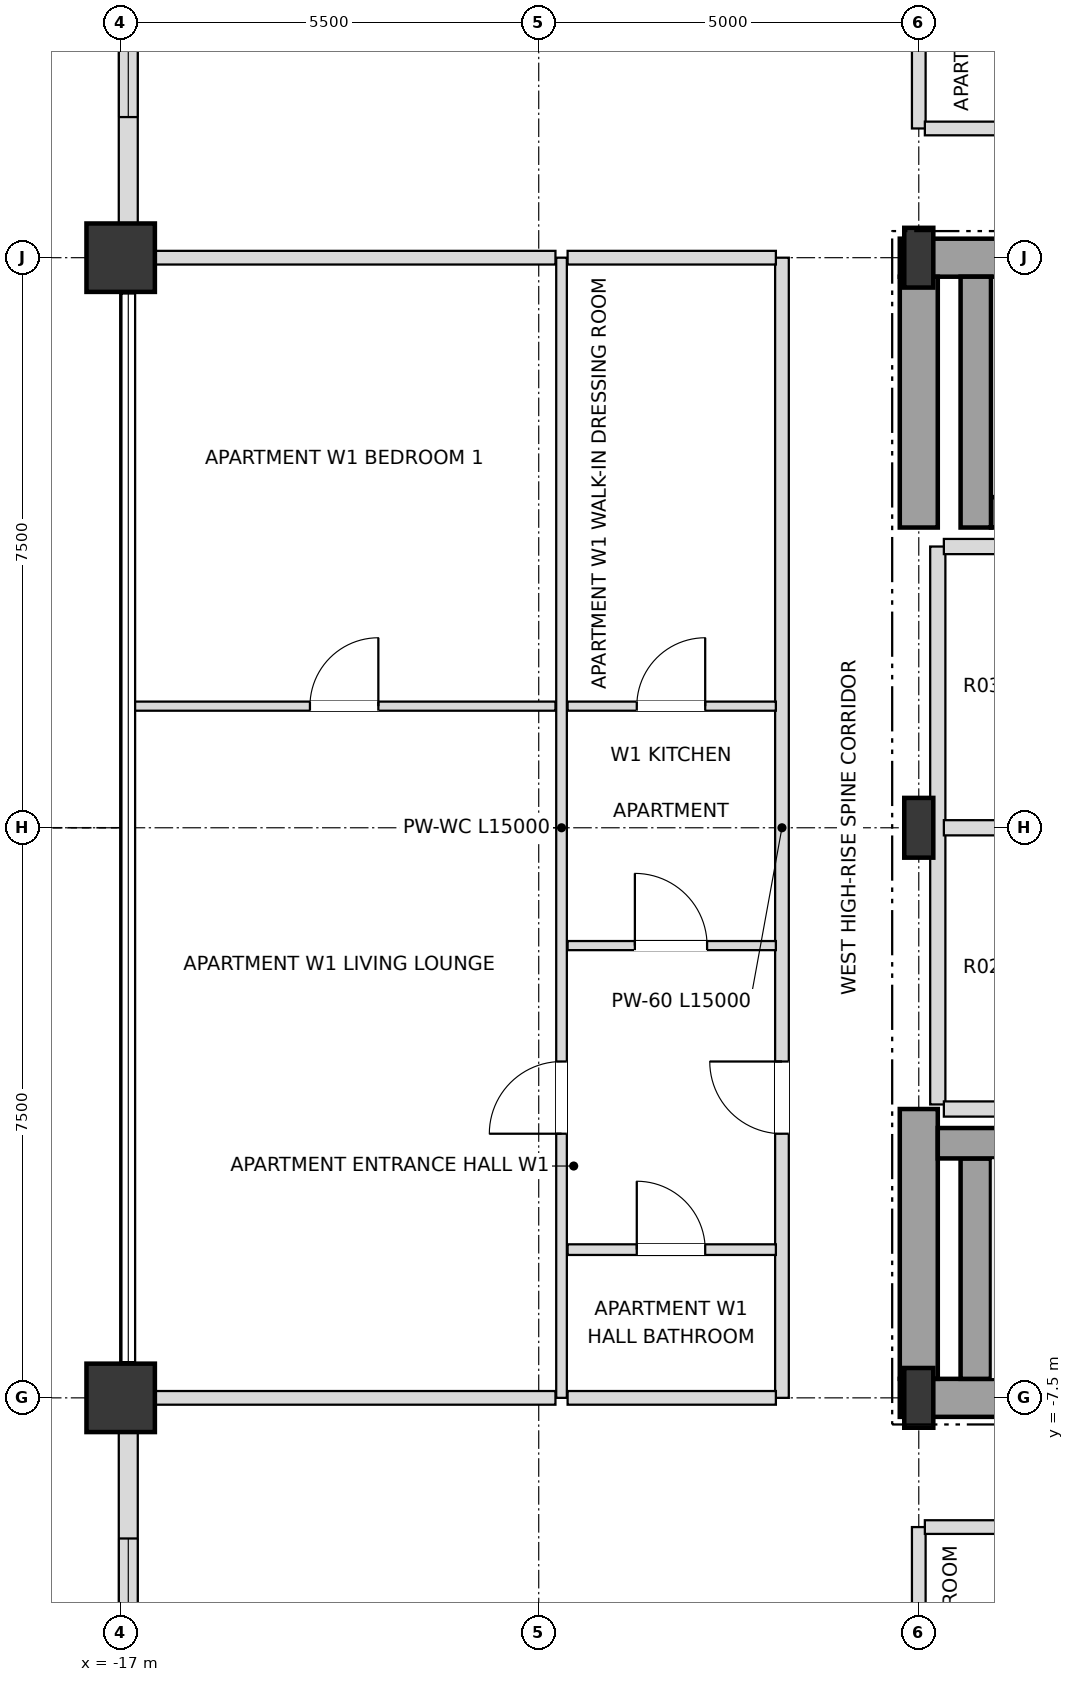
"""IFC4 building model, lengths in metres.
Left out: names, types, materials, properties, quantities, classifications, styles, units other than length and angle.
Written with IfcOpenShell. Run it as: python <this file> out.ifc"""

import sys

from ifc_helpers import new_model, si_unit, direction, frame, frame_2d, origin, origin_2d, place, context, subcontext, project, spatial, rectangle, i_section, extrude, element, fill, save


model = new_model("IFC4")
c1 = context("Model", 3, precision=1e-05, world=origin(), true_north=direction((0.0, 1.0)))
c2 = subcontext(c1, "Body", "Model", "MODEL_VIEW")
j1 = project(units=[si_unit("LENGTHUNIT", "METRE"), si_unit("PLANEANGLEUNIT", "RADIAN")], contexts=[c1])
p1 = place(None, origin())
s1 = spatial("IfcSite", under=j1, at=p1, CompositionType="ELEMENT")
p2 = place(p1, origin())
s2 = spatial("IfcBuilding", under=s1, at=p2, CompositionType="ELEMENT")
p3 = place(p2, frame((0.0, 0.0, 229.5)))
s3 = spatial("IfcBuildingStorey", under=s2, at=p3, CompositionType="ELEMENT", Elevation=229.5)
for number, where, z_axis, x_axis in (
    (1, (-6.5, -7.5, 0.0), (0.0, 0.0, 1.0), (1.0, 0.0, 0.0)),
    (2, (-6.5, 0.0, 0.0), (0.0, 0.0, 1.0), (1.0, 0.0, 0.0)),
    (3, (-6.5, 7.5, 0.0), (0.0, 0.0, 1.0), (1.0, 0.0, 0.0)),
):
    element("IfcColumn", number, at=place(p3, frame(where, z_axis=z_axis, x_axis=x_axis)), inside=s3, PredefinedType="COLUMN", context=c2, shape_type="SweptSolid", body=[
        extrude(i_section(OverallWidth=0.382, OverallDepth=0.786, WebThickness=0.02, FlangeThickness=0.033, at=origin_2d()), origin(), (0.0, 0.0, 1.0), 3.6),
    ])
for number, where, z_axis, x_axis in (
    (4, (-17.0, 7.5, 0.0), (0.0, 0.0, 1.0), (1.0, 0.0, 0.0)),
    (5, (-17.0, -7.5, 0.0), (0.0, 0.0, 1.0), (1.0, 0.0, 0.0)),
):
    element("IfcColumn", number, at=place(p3, frame(where, z_axis=z_axis, x_axis=x_axis)), inside=s3, PredefinedType="USERDEFINED", context=c2, shape_type="SweptSolid", body=[
        extrude(rectangle(XDim=0.9, YDim=0.9, at=origin_2d()), origin(), (0.0, 0.0, 1.0), 3.6),
    ])
p4 = place(p3, frame((-16.9, 12.555, 0.0), z_axis=(0.0, 0.0, 1.0), x_axis=(0.0, -1.0, 0.0)))
e6 = element("IfcWall", 6, at=p4, inside=s3, PredefinedType="SOLIDWALL", context=c2, shape_type="SweptSolid", body=[
    extrude(rectangle(XDim=4.61, YDim=0.25, at=frame_2d((2.305, 0.0))), origin(), (0.0, 0.0, 1.0), 2.748),
])
p5 = place(p4, frame((1.405, 0.0, 0.72)))
e7 = element("IfcOpeningElement", 7, at=p5, cuts=e6, PredefinedType="OPENING", context=c2, shape_type="SweptSolid", body=[
    extrude(rectangle(XDim=1.8, YDim=1.68, at=frame_2d((0.9, 0.84))), frame((0.0, 0.135, 0.0), z_axis=(0.0, -1.0, 0.0), x_axis=(1.0, 0.0, 0.0)), (0.0, 0.0, 1.0), 0.27),
])
p6 = place(p3, frame((-16.9, -7.945, 0.0), z_axis=(0.0, 0.0, 1.0), x_axis=(0.0, -1.0, 0.0)))
e8 = element("IfcWall", 8, at=p6, inside=s3, PredefinedType="SOLIDWALL", context=c2, shape_type="SweptSolid", body=[
    extrude(rectangle(XDim=4.61, YDim=0.25, at=frame_2d((2.305, 0.0))), origin(), (0.0, 0.0, 1.0), 2.748),
])
p7 = place(p6, frame((1.405, 0.0, 0.72)))
e9 = element("IfcOpeningElement", 9, at=p7, cuts=e8, PredefinedType="OPENING", context=c2, shape_type="SweptSolid", body=[
    extrude(rectangle(XDim=1.8, YDim=1.68, at=frame_2d((0.9, 0.84))), frame((0.0, 0.135, 0.0), z_axis=(0.0, -1.0, 0.0), x_axis=(1.0, 0.0, 0.0)), (0.0, 0.0, 1.0), 0.27),
])
p8 = place(p3, frame((-6.75, -7.5, 0.0), z_axis=(0.0, 0.0, 1.0), x_axis=(1.0, 0.0, 0.0)))
e10 = element("IfcWall", 10, at=p8, inside=s3, PredefinedType="SHEAR", context=c2, shape_type="SweptSolid", body=[
    extrude(rectangle(XDim=6.75, YDim=0.5, at=frame_2d((3.375, 0.0))), origin(), (0.0, 0.0, 1.0), 3.38),
])
p9 = place(p3, frame((-6.75, 7.5, 0.0), z_axis=(0.0, 0.0, 1.0), x_axis=(1.0, 0.0, 0.0)))
e11 = element("IfcWall", 11, at=p9, inside=s3, PredefinedType="SHEAR", context=c2, shape_type="SweptSolid", body=[
    extrude(rectangle(XDim=6.75, YDim=0.5, at=frame_2d((3.375, 0.0))), origin(), (0.0, 0.0, 1.0), 3.38),
])
p10 = place(p9, frame((1.65, 0.0, 0.0)))
e12 = element("IfcOpeningElement", 12, at=p10, cuts=e11, PredefinedType="OPENING", context=c2, shape_type="SweptSolid", body=[
    extrude(rectangle(XDim=1.05, YDim=2.15, at=frame_2d((0.525, 1.075))), frame((0.0, 0.26, 0.0), z_axis=(0.0, -1.0, 0.0), x_axis=(1.0, 0.0, 0.0)), (0.0, 0.0, 1.0), 0.52),
])
p11 = place(p3, frame((-6.5, -7.25, 0.0), z_axis=(0.0, 0.0, 1.0), x_axis=(0.0, 1.0, 0.0)))
e13 = element("IfcWall", 13, at=p11, inside=s3, PredefinedType="SHEAR", context=c2, shape_type="SweptSolid", body=[
    extrude(rectangle(XDim=3.55, YDim=0.5, at=frame_2d((1.775, 0.0))), origin(), (0.0, 0.0, 1.0), 3.38),
])
p12 = place(p3, frame((-6.5, 3.95, 0.0), z_axis=(0.0, 0.0, 1.0), x_axis=(0.0, 1.0, 0.0)))
e14 = element("IfcWall", 14, at=p12, inside=s3, PredefinedType="SHEAR", context=c2, shape_type="SweptSolid", body=[
    extrude(rectangle(XDim=3.3, YDim=0.5, at=frame_2d((1.65, 0.0))), origin(), (0.0, 0.0, 1.0), 3.38),
])
p13 = place(p3, frame((-5.75, -7.25, 0.0), z_axis=(0.0, 0.0, 1.0), x_axis=(0.0, 1.0, 0.0)))
e15 = element("IfcWall", 15, at=p13, inside=s3, PredefinedType="SHEAR", context=c2, shape_type="SweptSolid", body=[
    extrude(rectangle(XDim=2.9, YDim=0.4, at=frame_2d((1.45, 0.0))), origin(), (0.0, 0.0, 1.0), 3.38),
])
p14 = place(p3, frame((-6.25, -4.15, 0.0), z_axis=(0.0, 0.0, 1.0), x_axis=(1.0, 0.0, 0.0)))
e16 = element("IfcWall", 16, at=p14, inside=s3, PredefinedType="SHEAR", context=c2, shape_type="SweptSolid", body=[
    extrude(rectangle(XDim=7.78, YDim=0.4, at=frame_2d((3.89, 0.0))), origin(), (0.0, 0.0, 1.0), 3.38),
])
p15 = place(p3, frame((-5.55, 4.15, 0.0), z_axis=(0.0, 0.0, 1.0), x_axis=(1.0, 0.0, 0.0)))
e17 = element("IfcWall", 17, at=p15, inside=s3, PredefinedType="SHEAR", context=c2, shape_type="SweptSolid", body=[
    extrude(rectangle(XDim=7.08, YDim=0.4, at=frame_2d((3.54, 0.0))), origin(), (0.0, 0.0, 1.0), 3.38),
])
p16 = place(p3, frame((-5.75, 3.95, 0.0), z_axis=(0.0, 0.0, 1.0), x_axis=(0.0, 1.0, 0.0)))
e18 = element("IfcWall", 18, at=p16, inside=s3, PredefinedType="SHEAR", context=c2, shape_type="SweptSolid", body=[
    extrude(rectangle(XDim=3.3, YDim=0.4, at=frame_2d((1.65, 0.0))), origin(), (0.0, 0.0, 1.0), 3.38),
])
p17 = place(p3, frame((-11.2, -7.5, 0.0), z_axis=(0.0, 0.0, 1.0), x_axis=(0.0, 1.0, 0.0)))
e19 = element("IfcWall", 19, at=p17, inside=s3, PredefinedType="PARTITIONING", context=c2, shape_type="SweptSolid", body=[
    extrude(rectangle(XDim=15.0, YDim=0.14, at=frame_2d((7.5, 0.0))), origin(), (0.0, 0.0, 1.0), 3.38),
])
p18 = place(p17, frame((3.475, 0.0, 0.0)))
e20 = element("IfcOpeningElement", 20, at=p18, cuts=e19, PredefinedType="OPENING", context=c2, shape_type="SweptSolid", body=[
    extrude(rectangle(XDim=0.95, YDim=2.1, at=frame_2d((0.475, 1.05))), frame((0.0, 0.08, 0.0), z_axis=(0.0, -1.0, 0.0), x_axis=(1.0, 0.0, 0.0)), (0.0, 0.0, 1.0), 0.16),
])
p19 = place(p3, frame((-8.3, -7.5, 0.0), z_axis=(0.0, 0.0, 1.0), x_axis=(0.0, 1.0, 0.0)))
e21 = element("IfcWall", 21, at=p19, inside=s3, PredefinedType="PARTITIONING", context=c2, shape_type="SweptSolid", body=[
    extrude(rectangle(XDim=15.0, YDim=0.18, at=frame_2d((7.5, 0.0))), origin(), (0.0, 0.0, 1.0), 3.38),
])
p20 = place(p19, frame((3.475, 0.0, 0.0)))
e22 = element("IfcOpeningElement", 22, at=p20, cuts=e21, PredefinedType="OPENING", context=c2, shape_type="SweptSolid", body=[
    extrude(rectangle(XDim=0.95, YDim=2.15, at=frame_2d((0.475, 1.075))), frame((0.0, 0.1, 0.0), z_axis=(0.0, -1.0, 0.0), x_axis=(1.0, 0.0, 0.0)), (0.0, 0.0, 1.0), 0.2),
])
for number, where, z_axis, x_axis in (
    (23, (-6.5, -19.9, 0.0), (0.0, 0.0, 1.0), (0.0, 1.0, 0.0)),
    (24, (-6.5, 9.2, 0.0), (0.0, 0.0, 1.0), (0.0, 1.0, 0.0)),
):
    element("IfcWall", number, at=place(p3, frame(where, z_axis=z_axis, x_axis=x_axis)), inside=s3, PredefinedType="PARTITIONING", context=c2, shape_type="SweptSolid", body=[
        extrude(rectangle(XDim=10.7, YDim=0.18, at=frame_2d((5.35, 0.0))), origin(), (0.0, 0.0, 1.0), 2.826),
    ])
p21 = place(p3, frame((-6.25, -3.64, 0.0), z_axis=(0.0, 0.0, 1.0), x_axis=(0.0, 1.0, 0.0)))
e25 = element("IfcWall", 25, at=p21, inside=s3, PredefinedType="SOLIDWALL", context=c2, shape_type="SweptSolid", body=[
    extrude(rectangle(XDim=7.34, YDim=0.2, at=frame_2d((3.67, 0.0))), origin(), (0.0, 0.0, 1.0), 3.38),
])
p22 = place(p3, frame((-6.42, -9.2, 0.0), z_axis=(0.0, 0.0, 1.0), x_axis=(1.0, 0.0, 0.0)))
e26 = element("IfcWall", 26, at=p22, inside=s3, PredefinedType="PARTITIONING", context=c2, shape_type="SweptSolid", body=[
    extrude(rectangle(XDim=1.64, YDim=0.18, at=frame_2d((0.82, 0.0))), origin(), (0.0, 0.0, 1.0), 3.38),
])
p23 = place(p3, frame((-16.9, -7.5, 0.0), z_axis=(0.0, 0.0, 1.0), x_axis=(1.0, 0.0, 0.0)))
e27 = element("IfcWall", 27, at=p23, inside=s3, PredefinedType="PARTITIONING", context=c2, shape_type="SweptSolid", body=[
    extrude(rectangle(XDim=5.62, YDim=0.18, at=frame_2d((2.81, 0.0))), origin(), (0.0, 0.0, 1.0), 2.826),
])
p24 = place(p3, frame((-11.12, -7.5, 0.0), z_axis=(0.0, 0.0, 1.0), x_axis=(1.0, 0.0, 0.0)))
e28 = element("IfcWall", 28, at=p24, inside=s3, PredefinedType="PARTITIONING", context=c2, shape_type="SweptSolid", body=[
    extrude(rectangle(XDim=2.74, YDim=0.18, at=frame_2d((1.37, 0.0))), origin(), (0.0, 0.0, 1.0), 2.826),
])
p25 = place(p3, frame((-11.12, -5.55, 0.0), z_axis=(0.0, 0.0, 1.0), x_axis=(1.0, 0.0, 0.0)))
e29 = element("IfcWall", 29, at=p25, inside=s3, PredefinedType="PARTITIONING", context=c2, shape_type="SweptSolid", body=[
    extrude(rectangle(XDim=2.74, YDim=0.14, at=frame_2d((1.37, 0.0))), origin(), (0.0, 0.0, 1.0), 3.38),
])
p26 = place(p25, frame((0.91, 0.0, 0.0)))
e30 = element("IfcOpeningElement", 30, at=p26, cuts=e29, PredefinedType="OPENING", context=c2, shape_type="SweptSolid", body=[
    extrude(rectangle(XDim=0.9, YDim=2.1, at=frame_2d((0.45, 1.05))), frame((0.0, 0.08, 0.0), z_axis=(0.0, -1.0, 0.0), x_axis=(1.0, 0.0, 0.0)), (0.0, 0.0, 1.0), 0.16),
])
p27 = place(p3, frame((-6.17, -3.7, 0.0), z_axis=(0.0, 0.0, 1.0), x_axis=(1.0, 0.0, 0.0)))
e31 = element("IfcWall", 31, at=p27, inside=s3, PredefinedType="SOLIDWALL", context=c2, shape_type="SweptSolid", body=[
    extrude(rectangle(XDim=1.94, YDim=0.2, at=frame_2d((0.97, 0.0))), origin(), (0.0, 0.0, 1.0), 3.38),
])
p28 = place(p3, frame((-11.12, -1.55, 0.0), z_axis=(0.0, 0.0, 1.0), x_axis=(1.0, 0.0, 0.0)))
e32 = element("IfcWall", 32, at=p28, inside=s3, PredefinedType="PARTITIONING", context=c2, shape_type="SweptSolid", body=[
    extrude(rectangle(XDim=2.74, YDim=0.12, at=frame_2d((1.37, 0.0))), origin(), (0.0, 0.0, 1.0), 3.38),
])
p29 = place(p28, frame((0.885, 0.0, 0.0)))
e33 = element("IfcOpeningElement", 33, at=p29, cuts=e32, PredefinedType="OPENING", context=c2, shape_type="SweptSolid", body=[
    extrude(rectangle(XDim=0.95, YDim=2.1, at=frame_2d((0.475, 1.05))), frame((0.0, 0.07, 0.0), z_axis=(0.0, -1.0, 0.0), x_axis=(1.0, 0.0, 0.0)), (0.0, 0.0, 1.0), 0.14),
])
p30 = place(p3, frame((-6.17, 0.0, 0.0), z_axis=(0.0, 0.0, 1.0), x_axis=(1.0, 0.0, 0.0)))
e34 = element("IfcWall", 34, at=p30, inside=s3, PredefinedType="SOLIDWALL", context=c2, shape_type="SweptSolid", body=[
    extrude(rectangle(XDim=1.94, YDim=0.2, at=frame_2d((0.97, 0.0))), origin(), (0.0, 0.0, 1.0), 3.38),
])
p31 = place(p3, frame((-16.82, 1.6, 0.0), z_axis=(0.0, 0.0, 1.0), x_axis=(1.0, 0.0, 0.0)))
e35 = element("IfcWall", 35, at=p31, inside=s3, PredefinedType="PARTITIONING", context=c2, shape_type="SweptSolid", body=[
    extrude(rectangle(XDim=5.54, YDim=0.12, at=frame_2d((2.77, 0.0))), origin(), (0.0, 0.0, 1.0), 3.018),
])
p32 = place(p31, frame((2.31, 0.0, 0.0)))
e36 = element("IfcOpeningElement", 36, at=p32, cuts=e35, PredefinedType="OPENING", context=c2, shape_type="SweptSolid", body=[
    extrude(rectangle(XDim=0.9, YDim=2.1, at=frame_2d((0.45, 1.05))), frame((0.0, 0.07, 0.0), z_axis=(0.0, -1.0, 0.0), x_axis=(1.0, 0.0, 0.0)), (0.0, 0.0, 1.0), 0.14),
])
p33 = place(p3, frame((-11.12, 1.6, 0.0), z_axis=(0.0, 0.0, 1.0), x_axis=(1.0, 0.0, 0.0)))
e37 = element("IfcWall", 37, at=p33, inside=s3, PredefinedType="PARTITIONING", context=c2, shape_type="SweptSolid", body=[
    extrude(rectangle(XDim=2.74, YDim=0.12, at=frame_2d((1.37, 0.0))), origin(), (0.0, 0.0, 1.0), 3.38),
])
p34 = place(p33, frame((0.91, 0.0, 0.0)))
e38 = element("IfcOpeningElement", 38, at=p34, cuts=e37, PredefinedType="OPENING", context=c2, shape_type="SweptSolid", body=[
    extrude(rectangle(XDim=0.9, YDim=2.1, at=frame_2d((0.45, 1.05))), frame((0.0, 0.07, 0.0), z_axis=(0.0, -1.0, 0.0), x_axis=(1.0, 0.0, 0.0)), (0.0, 0.0, 1.0), 0.14),
])
p35 = place(p3, frame((-6.17, 3.7, 0.0), z_axis=(0.0, 0.0, 1.0), x_axis=(1.0, 0.0, 0.0)))
e39 = element("IfcWall", 39, at=p35, inside=s3, PredefinedType="SOLIDWALL", context=c2, shape_type="SweptSolid", body=[
    extrude(rectangle(XDim=1.94, YDim=0.2, at=frame_2d((0.97, 0.0))), origin(), (0.0, 0.0, 1.0), 3.38),
])
p36 = place(p3, frame((-16.9, 7.5, 0.0), z_axis=(0.0, 0.0, 1.0), x_axis=(1.0, 0.0, 0.0)))
e40 = element("IfcWall", 40, at=p36, inside=s3, PredefinedType="PARTITIONING", context=c2, shape_type="SweptSolid", body=[
    extrude(rectangle(XDim=5.62, YDim=0.18, at=frame_2d((2.81, 0.0))), origin(), (0.0, 0.0, 1.0), 2.826),
])
p37 = place(p3, frame((-11.12, 7.5, 0.0), z_axis=(0.0, 0.0, 1.0), x_axis=(1.0, 0.0, 0.0)))
e41 = element("IfcWall", 41, at=p37, inside=s3, PredefinedType="PARTITIONING", context=c2, shape_type="SweptSolid", body=[
    extrude(rectangle(XDim=2.74, YDim=0.18, at=frame_2d((1.37, 0.0))), origin(), (0.0, 0.0, 1.0), 2.826),
])
p38 = place(p3, frame((-6.42, 9.2, 0.0), z_axis=(0.0, 0.0, 1.0), x_axis=(1.0, 0.0, 0.0)))
e42 = element("IfcWall", 42, at=p38, inside=s3, PredefinedType="PARTITIONING", context=c2, shape_type="SweptSolid", body=[
    extrude(rectangle(XDim=1.79, YDim=0.18, at=frame_2d((0.895, 0.0))), origin(), (0.0, 0.0, 1.0), 3.38),
])
p39 = place(p5, origin())
e43 = element("IfcWindow", 43, at=p39, inside=s3, PartitioningType="SINGLE_PANEL", PredefinedType="WINDOW", context=c2, shape_type="SweptSolid", body=[
    extrude(rectangle(XDim=1.8, YDim=1.68, at=frame_2d((0.9, 0.84))), frame((0.0, 0.03, 0.0), z_axis=(0.0, -1.0, 0.0), x_axis=(1.0, 0.0, 0.0)), (0.0, 0.0, 1.0), 0.06),
])
fill(e7, e43)
p40 = place(p7, origin())
e44 = element("IfcWindow", 44, at=p40, inside=s3, PartitioningType="SINGLE_PANEL", PredefinedType="WINDOW", context=c2, shape_type="SweptSolid", body=[
    extrude(rectangle(XDim=1.8, YDim=1.68, at=frame_2d((0.9, 0.84))), frame((0.0, 0.03, 0.0), z_axis=(0.0, -1.0, 0.0), x_axis=(1.0, 0.0, 0.0)), (0.0, 0.0, 1.0), 0.06),
])
fill(e9, e44)
p41 = place(p26, origin())
e45 = element("IfcDoor", 45, at=p41, inside=s3, OperationType="SINGLE_SWING_LEFT", PredefinedType="DOOR", context=c2, shape_type="SweptSolid", body=[
    extrude(rectangle(XDim=0.9, YDim=2.1, at=frame_2d((0.45, 1.05))), frame((0.0, 0.025, 0.0), z_axis=(0.0, -1.0, 0.0), x_axis=(1.0, 0.0, 0.0)), (0.0, 0.0, 1.0), 0.05),
])
fill(e30, e45)
p42 = place(p20, origin())
e46 = element("IfcDoor", 46, at=p42, inside=s3, OperationType="SINGLE_SWING_RIGHT", PredefinedType="DOOR", context=c2, shape_type="SweptSolid", body=[
    extrude(rectangle(XDim=0.95, YDim=2.15, at=frame_2d((0.475, 1.075))), frame((0.0, 0.025, 0.0), z_axis=(0.0, -1.0, 0.0), x_axis=(1.0, 0.0, 0.0)), (0.0, 0.0, 1.0), 0.05),
])
fill(e22, e46)
p43 = place(p29, origin())
e47 = element("IfcDoor", 47, at=p43, inside=s3, OperationType="SINGLE_SWING_LEFT", PredefinedType="DOOR", context=c2, shape_type="SweptSolid", body=[
    extrude(rectangle(XDim=0.95, YDim=2.1, at=frame_2d((0.475, 1.05))), frame((0.0, 0.025, 0.0), z_axis=(0.0, -1.0, 0.0), x_axis=(1.0, 0.0, 0.0)), (0.0, 0.0, 1.0), 0.05),
])
fill(e33, e47)
p44 = place(p34, origin())
e48 = element("IfcDoor", 48, at=p44, inside=s3, OperationType="SINGLE_SWING_RIGHT", PredefinedType="DOOR", context=c2, shape_type="SweptSolid", body=[
    extrude(rectangle(XDim=0.9, YDim=2.1, at=frame_2d((0.45, 1.05))), frame((0.0, 0.025, 0.0), z_axis=(0.0, -1.0, 0.0), x_axis=(1.0, 0.0, 0.0)), (0.0, 0.0, 1.0), 0.05),
])
fill(e38, e48)
p45 = place(p18, origin())
e49 = element("IfcDoor", 49, at=p45, inside=s3, OperationType="SINGLE_SWING_LEFT", PredefinedType="DOOR", context=c2, shape_type="SweptSolid", body=[
    extrude(rectangle(XDim=0.95, YDim=2.1, at=frame_2d((0.475, 1.05))), frame((0.0, 0.025, 0.0), z_axis=(0.0, -1.0, 0.0), x_axis=(1.0, 0.0, 0.0)), (0.0, 0.0, 1.0), 0.05),
])
fill(e20, e49)
p46 = place(p32, origin())
e50 = element("IfcDoor", 50, at=p46, inside=s3, OperationType="SINGLE_SWING_RIGHT", PredefinedType="DOOR", context=c2, shape_type="SweptSolid", body=[
    extrude(rectangle(XDim=0.9, YDim=2.1, at=frame_2d((0.45, 1.05))), frame((0.0, 0.025, 0.0), z_axis=(0.0, -1.0, 0.0), x_axis=(1.0, 0.0, 0.0)), (0.0, 0.0, 1.0), 0.05),
])
fill(e36, e50)
save(model, sys.argv[1])
